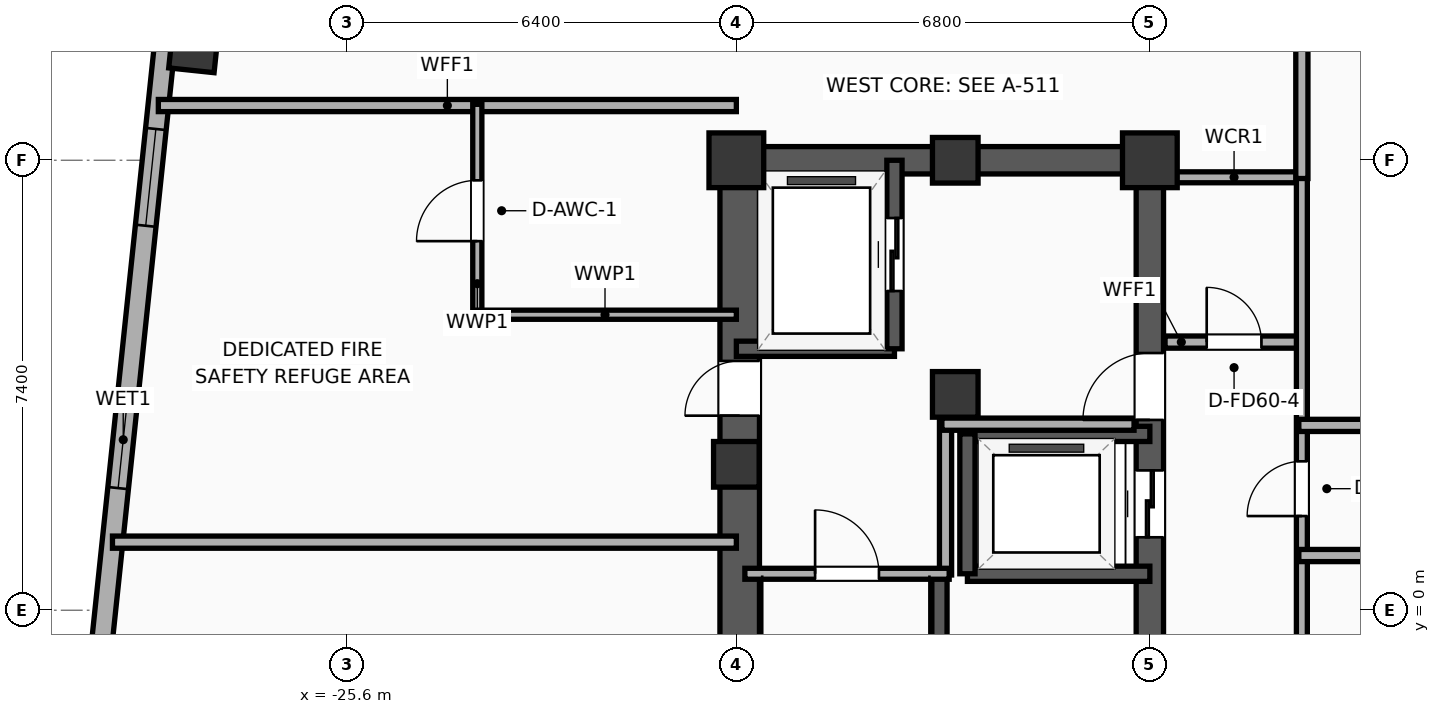
"""IFC4 building model, lengths in metres.
Left out: names, types, materials, properties, quantities, classifications, styles, units other than length and angle.
Written with IfcOpenShell. Run it as: python <this file> out.ifc"""

import sys

from ifc_helpers import new_model, si_unit, direction, frame, frame_2d, origin, origin_2d, place, context, subcontext, project, spatial, rectangle, hollow_rectangle, extrude, element, fill, save


model = new_model("IFC4")
c1 = context("Model", 3, precision=1e-05, world=origin(), true_north=direction((0.0, 1.0)))
c2 = subcontext(c1, "Body", "Model", "MODEL_VIEW")
j1 = project(units=[si_unit("LENGTHUNIT", "METRE"), si_unit("PLANEANGLEUNIT", "RADIAN")], contexts=[c1])
p1 = place(None, origin())
s1 = spatial("IfcSite", under=j1, at=p1, CompositionType="ELEMENT")
p2 = place(p1, origin())
s2 = spatial("IfcBuilding", under=s1, at=p2, CompositionType="ELEMENT")
p3 = place(p2, frame((0.0, 0.0, 254.8)))
s3 = spatial("IfcBuildingStorey", under=s2, at=p3, CompositionType="ELEMENT", Elevation=254.8)
p4 = place(p3, frame((-19.2, 2.4, 0.0), z_axis=(0.0, 0.0, 1.0), x_axis=(1.0, 0.0, 0.0)))
e1 = element("IfcColumn", 1, at=p4, inside=s3, PredefinedType="COLUMN", context=c2, shape_type="SweptSolid", body=[
    extrude(rectangle(XDim=0.75, YDim=0.75, at=origin_2d()), origin(), (0.0, 0.0, 1.0), 5.2),
])
p5 = place(p3, frame((-19.2, 7.4, 0.0), z_axis=(0.0, 0.0, 1.0), x_axis=(1.0, 0.0, 0.0)))
e2 = element("IfcColumn", 2, at=p5, inside=s3, PredefinedType="COLUMN", context=c2, shape_type="SweptSolid", body=[
    extrude(rectangle(XDim=0.9, YDim=0.9, at=origin_2d()), origin(), (0.0, 0.0, 1.0), 5.2),
])
for number, where, z_axis, x_axis in (
    (3, (-15.6, 7.4, 0.0), (0.0, 0.0, 1.0), (1.0, 0.0, 0.0)),
    (4, (-15.6, 3.55, 0.0), (0.0, 0.0, 1.0), (1.0, 0.0, 0.0)),
):
    element("IfcColumn", number, at=place(p3, frame(where, z_axis=z_axis, x_axis=x_axis)), inside=s3, PredefinedType="COLUMN", context=c2, shape_type="SweptSolid", body=[
        extrude(rectangle(XDim=0.75, YDim=0.75, at=origin_2d()), origin(), (0.0, 0.0, 1.0), 5.2),
    ])
p6 = place(p3, frame((-12.4, 7.4, 0.0), z_axis=(0.0, 0.0, 1.0), x_axis=(1.0, 0.0, 0.0)))
e5 = element("IfcColumn", 5, at=p6, inside=s3, PredefinedType="COLUMN", context=c2, shape_type="SweptSolid", body=[
    extrude(rectangle(XDim=0.9, YDim=0.9, at=origin_2d()), origin(), (0.0, 0.0, 1.0), 5.2),
])
p7 = place(p3, frame((-19.425, 7.4, 0.0), z_axis=(0.0, 0.0, 1.0), x_axis=(1.0, 0.0, 0.0)))
e6 = element("IfcWall", 6, at=p7, inside=s3, PredefinedType="SHEAR", context=c2, shape_type="SweptSolid", body=[
    extrude(rectangle(XDim=7.25, YDim=0.45, at=frame_2d((3.625, 0.0))), origin(), (0.0, 0.0, 1.0), 4.8),
])
p8 = place(p3, frame((-19.145, -7.4, 0.0), z_axis=(0.0, 0.0, 1.0), x_axis=(0.0, 1.0, 0.0)))
e7 = element("IfcWall", 7, at=p8, inside=s3, PredefinedType="SHEAR", context=c2, shape_type="SweptSolid", body=[
    extrude(rectangle(XDim=14.8, YDim=0.65, at=frame_2d((7.4, 0.0))), origin(), (0.0, 0.0, 1.0), 4.8),
])
p9 = place(p8, frame((10.6, 0.0, 0.0)))
e8 = element("IfcOpeningElement", 8, at=p9, cuts=e7, PredefinedType="OPENING", context=c2, shape_type="SweptSolid", body=[
    extrude(rectangle(XDim=0.9, YDim=2.05, at=frame_2d((0.45, 1.025))), frame((0.0, 0.335, 0.0), z_axis=(0.0, -1.0, 0.0), x_axis=(1.0, 0.0, 0.0)), (0.0, 0.0, 1.0), 0.67),
])
p10 = place(p3, frame((-12.4, -7.4, 0.0), z_axis=(0.0, 0.0, 1.0), x_axis=(0.0, 1.0, 0.0)))
e9 = element("IfcWall", 9, at=p10, inside=s3, PredefinedType="SHEAR", context=c2, shape_type="SweptSolid", body=[
    extrude(rectangle(XDim=14.8, YDim=0.45, at=frame_2d((7.4, 0.0))), origin(), (0.0, 0.0, 1.0), 4.8),
])
p11 = place(p10, frame((8.6, 0.0, 0.0)))
e10 = element("IfcOpeningElement", 10, at=p11, cuts=e9, PredefinedType="OPENING", context=c2, shape_type="SweptSolid", body=[
    extrude(rectangle(XDim=1.1, YDim=2.05, at=frame_2d((0.55, 1.025))), frame((0.0, 0.235, 0.0), z_axis=(0.0, -1.0, 0.0), x_axis=(1.0, 0.0, 0.0)), (0.0, 0.0, 1.0), 0.47),
])
p12 = place(p10, frame((10.53, 0.0, 0.0)))
e11 = element("IfcOpeningElement", 11, at=p12, cuts=e9, PredefinedType="OPENING", context=c2, shape_type="SweptSolid", body=[
    extrude(rectangle(XDim=1.1, YDim=2.05, at=frame_2d((0.55, 1.025))), frame((0.0, 0.235, 0.0), z_axis=(0.0, -1.0, 0.0), x_axis=(1.0, 0.0, 0.0)), (0.0, 0.0, 1.0), 0.47),
])
p13 = place(p10, frame((3.55, 0.0, 0.0)))
e12 = element("IfcOpeningElement", 12, at=p13, cuts=e9, PredefinedType="OPENING", context=c2, shape_type="SweptSolid", body=[
    extrude(rectangle(XDim=0.9, YDim=2.05, at=frame_2d((0.45, 1.025))), frame((0.0, 0.235, 0.0), z_axis=(0.0, -1.0, 0.0), x_axis=(1.0, 0.0, 0.0)), (0.0, 0.0, 1.0), 0.47),
])
p14 = place(p3, frame((-15.86, -7.085, 0.0), z_axis=(0.0, 0.0, 1.0), x_axis=(0.0, 1.0, 0.0)))
e13 = element("IfcWall", 13, at=p14, inside=s3, PredefinedType="SOLIDWALL", context=c2, shape_type="SweptSolid", body=[
    extrude(rectangle(XDim=7.685, YDim=0.25, at=frame_2d((3.843, 0.0))), origin(), (0.0, 0.0, 1.0), 4.8),
])
p15 = place(p3, frame((-28.123, 9.252, -0.4), z_axis=(0.0, 0.0, 1.0), x_axis=(0.994521895368, -0.104528463268, 0.0)))
e14 = element("IfcColumn", 14, at=p15, inside=s3, PredefinedType="COLUMN", context=c2, shape_type="SweptSolid", body=[
    extrude(hollow_rectangle(XDim=0.75, YDim=0.75, WallThickness=0.025, at=origin_2d()), origin(), (0.0, 0.0, 1.0), 5.6),
])
p16 = place(p3, frame((-30.87, -12.296, 0.0), z_axis=(0.0, 0.0, 1.0), x_axis=(0.104533282919, 0.994521388791, 0.0)))
e15 = element("IfcWall", 15, at=p16, inside=s3, PredefinedType="ELEMENTEDWALL", context=c2, shape_type="SweptSolid", body=[
    extrude(rectangle(XDim=30.366, YDim=0.34, at=frame_2d((15.183, 0.0))), origin(), (0.0, 0.0, 1.0), 3.69),
])
p17 = place(p16, frame((1.369, 0.0, 0.75)))
e16 = element("IfcOpeningElement", 16, at=p17, cuts=e15, PredefinedType="OPENING", context=c2, shape_type="SweptSolid", body=[
    extrude(rectangle(XDim=1.6, YDim=1.4, at=frame_2d((0.8, 0.7))), frame((0.0, 0.18, 0.0), z_axis=(0.0, -1.0, 0.0), x_axis=(1.0, 0.0, 0.0)), (0.0, 0.0, 1.0), 0.36),
])
p18 = place(p16, frame((5.707, 0.0, 0.75)))
e17 = element("IfcOpeningElement", 17, at=p18, cuts=e15, PredefinedType="OPENING", context=c2, shape_type="SweptSolid", body=[
    extrude(rectangle(XDim=1.6, YDim=1.4, at=frame_2d((0.8, 0.7))), frame((0.0, 0.18, 0.0), z_axis=(0.0, -1.0, 0.0), x_axis=(1.0, 0.0, 0.0)), (0.0, 0.0, 1.0), 0.36),
])
p19 = place(p16, frame((10.045, 0.0, 0.75)))
e18 = element("IfcOpeningElement", 18, at=p19, cuts=e15, PredefinedType="OPENING", context=c2, shape_type="SweptSolid", body=[
    extrude(rectangle(XDim=1.6, YDim=1.4, at=frame_2d((0.8, 0.7))), frame((0.0, 0.18, 0.0), z_axis=(0.0, -1.0, 0.0), x_axis=(1.0, 0.0, 0.0)), (0.0, 0.0, 1.0), 0.36),
])
p20 = place(p16, frame((14.383, 0.0, 0.75)))
e19 = element("IfcOpeningElement", 19, at=p20, cuts=e15, PredefinedType="OPENING", context=c2, shape_type="SweptSolid", body=[
    extrude(rectangle(XDim=1.6, YDim=1.4, at=frame_2d((0.8, 0.7))), frame((0.0, 0.18, 0.0), z_axis=(0.0, -1.0, 0.0), x_axis=(1.0, 0.0, 0.0)), (0.0, 0.0, 1.0), 0.36),
])
p21 = place(p16, frame((18.721, 0.0, 0.75)))
e20 = element("IfcOpeningElement", 20, at=p21, cuts=e15, PredefinedType="OPENING", context=c2, shape_type="SweptSolid", body=[
    extrude(rectangle(XDim=1.6, YDim=1.4, at=frame_2d((0.8, 0.7))), frame((0.0, 0.18, 0.0), z_axis=(0.0, -1.0, 0.0), x_axis=(1.0, 0.0, 0.0)), (0.0, 0.0, 1.0), 0.36),
])
p22 = place(p16, frame((23.059, 0.0, 0.75)))
e21 = element("IfcOpeningElement", 21, at=p22, cuts=e15, PredefinedType="OPENING", context=c2, shape_type="SweptSolid", body=[
    extrude(rectangle(XDim=1.6, YDim=1.4, at=frame_2d((0.8, 0.7))), frame((0.0, 0.18, 0.0), z_axis=(0.0, -1.0, 0.0), x_axis=(1.0, 0.0, 0.0)), (0.0, 0.0, 1.0), 0.36),
])
p23 = place(p16, frame((27.397, 0.0, 0.75)))
e22 = element("IfcOpeningElement", 22, at=p23, cuts=e15, PredefinedType="OPENING", context=c2, shape_type="SweptSolid", body=[
    extrude(rectangle(XDim=1.6, YDim=1.4, at=frame_2d((0.8, 0.7))), frame((0.0, 0.18, 0.0), z_axis=(0.0, -1.0, 0.0), x_axis=(1.0, 0.0, 0.0)), (0.0, 0.0, 1.0), 0.36),
])
p24 = place(p3, frame((-19.2, 4.3, 0.0), z_axis=(0.0, 0.0, 1.0), x_axis=(1.0, 0.0, 0.0)))
e23 = element("IfcWall", 23, at=p24, inside=s3, PredefinedType="SOLIDWALL", context=c2, shape_type="SweptSolid", body=[
    extrude(rectangle(XDim=2.6, YDim=0.25, at=frame_2d((1.3, 0.0))), origin(), (0.0, 0.0, 1.0), 4.8),
])
p25 = place(p3, frame((-16.6, 4.3, 0.0), z_axis=(0.0, 0.0, 1.0), x_axis=(0.0, 1.0, 0.0)))
e24 = element("IfcWall", 24, at=p25, inside=s3, PredefinedType="SOLIDWALL", context=c2, shape_type="SweptSolid", body=[
    extrude(rectangle(XDim=3.1, YDim=0.25, at=frame_2d((1.55, 0.0))), origin(), (0.0, 0.0, 1.0), 4.8),
])
p26 = place(p25, frame((0.95, 0.0, 0.0)))
e25 = element("IfcOpeningElement", 25, at=p26, cuts=e24, PredefinedType="OPENING", context=c2, shape_type="SweptSolid", body=[
    extrude(rectangle(XDim=1.2, YDim=2.05, at=frame_2d((0.6, 1.025))), frame((0.0, 0.135, 0.0), z_axis=(0.0, -1.0, 0.0), x_axis=(1.0, 0.0, 0.0)), (0.0, 0.0, 1.0), 0.27),
])
for number, where, z_axis, x_axis in (
    (26, (-15.4, 0.6, 0.0), (0.0, 0.0, 1.0), (1.0, 0.0, 0.0)),
    (27, (-12.4, 2.9, 0.0), (0.0, 0.0, 1.0), (-1.0, 0.0, 0.0)),
):
    element("IfcWall", number, at=place(p3, frame(where, z_axis=z_axis, x_axis=x_axis)), inside=s3, PredefinedType="SOLIDWALL", context=c2, shape_type="SweptSolid", body=[
        extrude(rectangle(XDim=3.0, YDim=0.25, at=frame_2d((1.5, 0.0))), origin(), (0.0, 0.0, 1.0), 4.8),
    ])
p27 = place(p3, frame((-15.4, 2.9, 0.0), z_axis=(0.0, 0.0, 1.0), x_axis=(0.0, -1.0, 0.0)))
e28 = element("IfcWall", 28, at=p27, inside=s3, PredefinedType="SOLIDWALL", context=c2, shape_type="SweptSolid", body=[
    extrude(rectangle(XDim=2.3, YDim=0.25, at=frame_2d((1.15, 0.0))), origin(), (0.0, 0.0, 1.0), 4.8),
])
p28 = place(p3, frame((-15.76, 0.58, 0.0), z_axis=(0.0, 0.0, 1.0), x_axis=(0.0, 1.0, 0.0)))
e29 = element("IfcWall", 29, at=p28, inside=s3, PredefinedType="PARTITIONING", context=c2, shape_type="SweptSolid", body=[
    extrude(rectangle(XDim=2.52, YDim=0.2, at=frame_2d((1.26, 0.0))), origin(), (0.0, 0.0, 1.0), 4.8),
])
p29 = place(p3, frame((-15.82, 3.06, 0.0), z_axis=(0.0, 0.0, 1.0), x_axis=(1.0, 0.0, 0.0)))
e30 = element("IfcWall", 30, at=p29, inside=s3, PredefinedType="PARTITIONING", context=c2, shape_type="SweptSolid", body=[
    extrude(rectangle(XDim=3.16, YDim=0.2, at=frame_2d((1.58, 0.0))), origin(), (0.0, 0.0, 1.0), 4.8),
])
p30 = place(p3, frame((-19.06, 0.6, 0.0), z_axis=(0.0, 0.0, 1.0), x_axis=(1.0, 0.0, 0.0)))
e31 = element("IfcWall", 31, at=p30, inside=s3, PredefinedType="PARTITIONING", context=c2, shape_type="SweptSolid", body=[
    extrude(rectangle(XDim=3.36, YDim=0.18, at=frame_2d((1.68, 0.0))), origin(), (0.0, 0.0, 1.0), 4.8),
])
p31 = place(p30, frame((1.155, 0.0, 0.0)))
e32 = element("IfcOpeningElement", 32, at=p31, cuts=e31, PredefinedType="OPENING", context=c2, shape_type="SweptSolid", body=[
    extrude(rectangle(XDim=1.05, YDim=2.05, at=frame_2d((0.525, 1.025))), frame((0.0, 0.1, 0.0), z_axis=(0.0, -1.0, 0.0), x_axis=(1.0, 0.0, 0.0)), (0.0, 0.0, 1.0), 0.2),
])
p32 = place(p3, frame((-12.15, 4.41, 0.0), z_axis=(0.0, 0.0, 1.0), x_axis=(1.0, 0.0, 0.0)))
e33 = element("IfcWall", 33, at=p32, inside=s3, PredefinedType="PARTITIONING", context=c2, shape_type="SweptSolid", body=[
    extrude(rectangle(XDim=2.27, YDim=0.2, at=frame_2d((1.135, 0.0))), origin(), (0.0, 0.0, 1.0), 4.8),
])
p33 = place(p32, frame((0.685, 0.0, 0.0)))
e34 = element("IfcOpeningElement", 34, at=p33, cuts=e33, PredefinedType="OPENING", context=c2, shape_type="SweptSolid", body=[
    extrude(rectangle(XDim=0.9, YDim=2.05, at=frame_2d((0.45, 1.025))), frame((0.0, 0.11, 0.0), z_axis=(0.0, -1.0, 0.0), x_axis=(1.0, 0.0, 0.0)), (0.0, 0.0, 1.0), 0.22),
])
p34 = place(p3, frame((-12.15, 7.12, 0.0), z_axis=(0.0, 0.0, 1.0), x_axis=(1.0, 0.0, 0.0)))
e35 = element("IfcWall", 35, at=p34, inside=s3, PredefinedType="PARTITIONING", context=c2, shape_type="SweptSolid", body=[
    extrude(rectangle(XDim=2.27, YDim=0.18, at=frame_2d((1.135, 0.0))), origin(), (0.0, 0.0, 1.0), 3.84),
])
p35 = place(p3, frame((-9.9, -7.14, 0.0), z_axis=(0.0, 0.0, 1.0), x_axis=(0.0, 1.0, 0.0)))
e36 = element("IfcWall", 36, at=p35, inside=s3, PredefinedType="PARTITIONING", context=c2, shape_type="SweptSolid", body=[
    extrude(rectangle(XDim=14.28, YDim=0.18, at=frame_2d((7.14, 0.0))), origin(), (0.0, 0.0, 1.0), 4.8),
])
p36 = place(p35, frame((8.689, 0.0, 0.0)))
e37 = element("IfcOpeningElement", 37, at=p36, cuts=e36, PredefinedType="OPENING", context=c2, shape_type="SweptSolid", body=[
    extrude(rectangle(XDim=0.9, YDim=2.05, at=frame_2d((0.45, 1.025))), frame((0.0, 0.1, 0.0), z_axis=(0.0, -1.0, 0.0), x_axis=(1.0, 0.0, 0.0)), (0.0, 0.0, 1.0), 0.2),
])
p37 = place(p3, frame((-9.95, 3.04, 0.0), z_axis=(0.0, 0.0, 1.0), x_axis=(1.0, 0.0, 0.0)))
e38 = element("IfcWall", 38, at=p37, inside=s3, PredefinedType="PARTITIONING", context=c2, shape_type="SweptSolid", body=[
    extrude(rectangle(XDim=19.9, YDim=0.2, at=frame_2d((9.95, 0.0))), origin(), (0.0, 0.0, 1.0), 4.8),
])
p38 = place(p37, frame((9.425, 0.0, 0.0)))
e39 = element("IfcOpeningElement", 39, at=p38, cuts=e38, PredefinedType="OPENING", context=c2, shape_type="SweptSolid", body=[
    extrude(rectangle(XDim=1.05, YDim=2.05, at=frame_2d((0.525, 1.025))), frame((0.0, 0.11, 0.0), z_axis=(0.0, -1.0, 0.0), x_axis=(1.0, 0.0, 0.0)), (0.0, 0.0, 1.0), 0.22),
])
p39 = place(p3, frame((-9.95, 0.9, 0.0), z_axis=(0.0, 0.0, 1.0), x_axis=(1.0, 0.0, 0.0)))
e40 = element("IfcWall", 40, at=p39, inside=s3, PredefinedType="PARTITIONING", context=c2, shape_type="SweptSolid", body=[
    extrude(rectangle(XDim=19.9, YDim=0.2, at=frame_2d((9.95, 0.0))), origin(), (0.0, 0.0, 1.0), 4.8),
])
p40 = place(p39, frame((9.425, 0.0, 0.0)))
e41 = element("IfcOpeningElement", 41, at=p40, cuts=e40, PredefinedType="OPENING", context=c2, shape_type="SweptSolid", body=[
    extrude(rectangle(XDim=1.05, YDim=2.05, at=frame_2d((0.525, 1.025))), frame((0.0, 0.11, 0.0), z_axis=(0.0, -1.0, 0.0), x_axis=(1.0, 0.0, 0.0)), (0.0, 0.0, 1.0), 0.22),
])
p41 = place(p3, frame((-29.46, 1.12, 0.0), z_axis=(0.0, 0.0, 1.0), x_axis=(1.0, 0.0, 0.0)))
e42 = element("IfcWall", 42, at=p41, inside=s3, PredefinedType="PARTITIONING", context=c2, shape_type="SweptSolid", body=[
    extrude(rectangle(XDim=10.26, YDim=0.2, at=frame_2d((5.13, 0.0))), origin(), (0.0, 0.0, 1.0), 4.8),
])
p42 = place(p3, frame((-28.705, 8.3, 0.0), z_axis=(0.0, 0.0, 1.0), x_axis=(1.0, 0.0, 0.0)))
e43 = element("IfcWall", 43, at=p42, inside=s3, PredefinedType="PARTITIONING", context=c2, shape_type="SweptSolid", body=[
    extrude(rectangle(XDim=9.505, YDim=0.2, at=frame_2d((4.753, 0.0))), origin(), (0.0, 0.0, 1.0), 3.69),
])
p43 = place(p3, frame((-23.46, 4.82, 0.0), z_axis=(0.0, 0.0, 1.0), x_axis=(0.0, 1.0, 0.0)))
e44 = element("IfcWall", 44, at=p43, inside=s3, PredefinedType="PLUMBINGWALL", context=c2, shape_type="SweptSolid", body=[
    extrude(rectangle(XDim=3.5, YDim=0.15, at=frame_2d((1.75, 0.0))), origin(), (0.0, 0.0, 1.0), 4.8),
])
p44 = place(p43, frame((1.25, 0.0, 0.0)))
e45 = element("IfcOpeningElement", 45, at=p44, cuts=e44, PredefinedType="OPENING", context=c2, shape_type="SweptSolid", body=[
    extrude(rectangle(XDim=1.0, YDim=2.05, at=frame_2d((0.5, 1.025))), frame((0.0, 0.085, 0.0), z_axis=(0.0, -1.0, 0.0), x_axis=(1.0, 0.0, 0.0)), (0.0, 0.0, 1.0), 0.17),
])
p45 = place(p3, frame((-23.52, 4.86, 0.0), z_axis=(0.0, 0.0, 1.0), x_axis=(1.0, 0.0, 0.0)))
e46 = element("IfcWall", 46, at=p45, inside=s3, PredefinedType="PLUMBINGWALL", context=c2, shape_type="SweptSolid", body=[
    extrude(rectangle(XDim=4.32, YDim=0.15, at=frame_2d((2.16, 0.0))), origin(), (0.0, 0.0, 1.0), 4.8),
])
p46 = place(p3, frame((-9.9, 7.1, 0.0), z_axis=(0.0, 0.0, 1.0), x_axis=(0.0, 1.0, 0.0)))
e47 = element("IfcWall", 47, at=p46, inside=s3, PredefinedType="PARTITIONING", context=c2, shape_type="SweptSolid", body=[
    extrude(rectangle(XDim=12.4, YDim=0.2, at=frame_2d((6.2, 0.0))), origin(), (0.0, 0.0, 1.0), 4.8),
])
p47 = place(p46, frame((6.667, 0.0, 0.0)))
e48 = element("IfcOpeningElement", 48, at=p47, cuts=e47, PredefinedType="OPENING", context=c2, shape_type="SweptSolid", body=[
    extrude(rectangle(XDim=1.05, YDim=2.05, at=frame_2d((0.525, 1.025))), frame((0.0, 0.11, 0.0), z_axis=(0.0, -1.0, 0.0), x_axis=(1.0, 0.0, 0.0)), (0.0, 0.0, 1.0), 0.22),
])
p48 = place(p20, origin())
e49 = element("IfcWindow", 49, at=p48, inside=s3, PartitioningType="SINGLE_PANEL", PredefinedType="WINDOW", context=c2, shape_type="SweptSolid", body=[
    extrude(rectangle(XDim=1.6, YDim=1.4, at=frame_2d((0.8, 0.7))), frame((0.0, 0.03, 0.0), z_axis=(0.0, -1.0, 0.0), x_axis=(1.0, 0.0, 0.0)), (0.0, 0.0, 1.0), 0.06),
])
fill(e19, e49)
p49 = place(p21, origin())
e50 = element("IfcWindow", 50, at=p49, inside=s3, PartitioningType="SINGLE_PANEL", PredefinedType="WINDOW", context=c2, shape_type="SweptSolid", body=[
    extrude(rectangle(XDim=1.6, YDim=1.4, at=frame_2d((0.8, 0.7))), frame((0.0, 0.03, 0.0), z_axis=(0.0, -1.0, 0.0), x_axis=(1.0, 0.0, 0.0)), (0.0, 0.0, 1.0), 0.06),
])
fill(e20, e50)
p50 = place(p26, origin())
e51 = element("IfcDoor", 51, at=p50, inside=s3, OperationType="SLIDING_TO_LEFT", PredefinedType="DOOR", context=c2, shape_type="SweptSolid", body=[
    extrude(rectangle(XDim=1.2, YDim=2.05, at=frame_2d((0.6, 1.025))), frame((0.0, 0.025, 0.0), z_axis=(0.0, -1.0, 0.0), x_axis=(1.0, 0.0, 0.0)), (0.0, 0.0, 1.0), 0.05),
])
fill(e25, e51)
p51 = place(p11, origin())
e52 = element("IfcDoor", 52, at=p51, inside=s3, OperationType="SLIDING_TO_LEFT", PredefinedType="DOOR", context=c2, shape_type="SweptSolid", body=[
    extrude(rectangle(XDim=1.1, YDim=2.05, at=frame_2d((0.55, 1.025))), frame((0.0, 0.025, 0.0), z_axis=(0.0, -1.0, 0.0), x_axis=(1.0, 0.0, 0.0)), (0.0, 0.0, 1.0), 0.05),
])
fill(e10, e52)
p52 = place(p31, origin())
e53 = element("IfcDoor", 53, at=p52, inside=s3, OperationType="SINGLE_SWING_LEFT", PredefinedType="DOOR", context=c2, shape_type="SweptSolid", body=[
    extrude(rectangle(XDim=1.05, YDim=2.05, at=frame_2d((0.525, 1.025))), frame((0.0, 0.025, 0.0), z_axis=(0.0, -1.0, 0.0), x_axis=(1.0, 0.0, 0.0)), (0.0, 0.0, 1.0), 0.05),
])
fill(e32, e53)
p53 = place(p33, origin())
e54 = element("IfcDoor", 54, at=p53, inside=s3, OperationType="SINGLE_SWING_LEFT", PredefinedType="DOOR", context=c2, shape_type="SweptSolid", body=[
    extrude(rectangle(XDim=0.9, YDim=2.05, at=frame_2d((0.45, 1.025))), frame((0.0, 0.025, 0.0), z_axis=(0.0, -1.0, 0.0), x_axis=(1.0, 0.0, 0.0)), (0.0, 0.0, 1.0), 0.05),
])
fill(e34, e54)
p54 = place(p36, origin())
e55 = element("IfcDoor", 55, at=p54, inside=s3, OperationType="SINGLE_SWING_LEFT", PredefinedType="DOOR", context=c2, shape_type="SweptSolid", body=[
    extrude(rectangle(XDim=0.9, YDim=2.05, at=frame_2d((0.45, 1.025))), frame((0.0, 0.025, 0.0), z_axis=(0.0, -1.0, 0.0), x_axis=(1.0, 0.0, 0.0)), (0.0, 0.0, 1.0), 0.05),
])
fill(e37, e55)
p55 = place(p44, origin())
e56 = element("IfcDoor", 56, at=p55, inside=s3, OperationType="SINGLE_SWING_LEFT", PredefinedType="DOOR", context=c2, shape_type="SweptSolid", body=[
    extrude(rectangle(XDim=1.0, YDim=2.05, at=frame_2d((0.5, 1.025))), frame((0.0, 0.025, 0.0), z_axis=(0.0, -1.0, 0.0), x_axis=(1.0, 0.0, 0.0)), (0.0, 0.0, 1.0), 0.05),
])
fill(e45, e56)
p56 = place(p12, origin())
e57 = element("IfcDoor", 57, at=p56, inside=s3, OperationType="SINGLE_SWING_LEFT", PredefinedType="DOOR", context=c2, shape_type="SweptSolid", body=[
    extrude(rectangle(XDim=1.1, YDim=2.05, at=frame_2d((0.55, 1.025))), frame((0.0, 0.025, 0.0), z_axis=(0.0, -1.0, 0.0), x_axis=(1.0, 0.0, 0.0)), (0.0, 0.0, 1.0), 0.05),
])
fill(e11, e57)
p57 = place(p9, origin())
e58 = element("IfcDoor", 58, at=p57, inside=s3, OperationType="SINGLE_SWING_LEFT", PredefinedType="DOOR", context=c2, shape_type="SweptSolid", body=[
    extrude(rectangle(XDim=0.9, YDim=2.05, at=frame_2d((0.45, 1.025))), frame((0.0, 0.025, 0.0), z_axis=(0.0, -1.0, 0.0), x_axis=(1.0, 0.0, 0.0)), (0.0, 0.0, 1.0), 0.05),
])
fill(e8, e58)
save(model, sys.argv[1])
